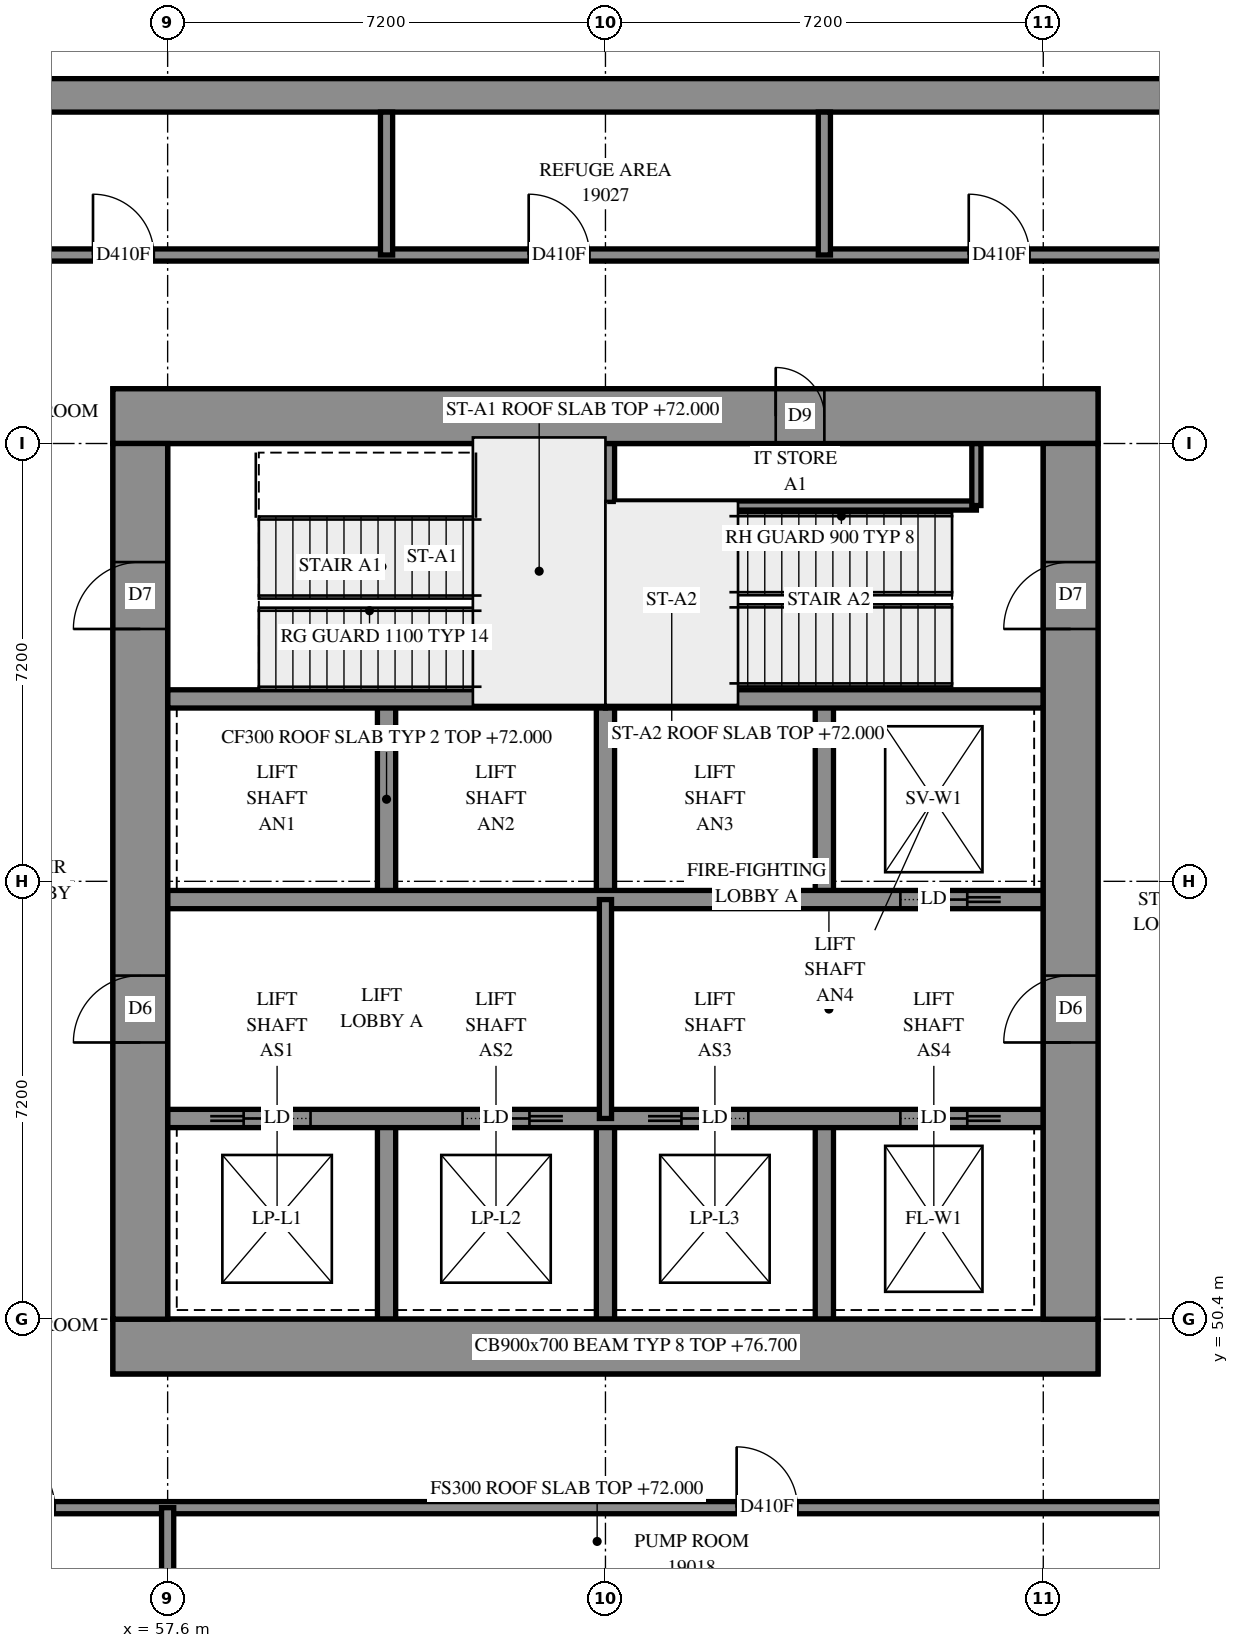
"""IFC4 building model, lengths in metres.
Left out: names, types, materials, properties, quantities, classifications, styles, units other than length and angle.
Written with IfcOpenShell. Run it as: python <this file> out.ifc"""

import sys

from ifc_helpers import new_model, si_unit, direction, frame, frame_2d, origin, place, context, subcontext, project, spatial, polyline, rectangle, outline, extrude, element, fill, save


model = new_model("IFC4")
c1 = context("Model", 3, precision=1e-05, world=origin(), true_north=direction((0.0, 1.0)))
c2 = subcontext(c1, "Body", "Model", "MODEL_VIEW")
j1 = project(units=[si_unit("LENGTHUNIT", "METRE"), si_unit("PLANEANGLEUNIT", "RADIAN")], contexts=[c1])
p1 = place(None, origin())
s1 = spatial("IfcSite", under=j1, at=p1, CompositionType="ELEMENT")
p2 = place(p1, origin())
s2 = spatial("IfcBuilding", under=s1, at=p2, CompositionType="ELEMENT")
p3 = place(p2, frame((0.0, 0.0, 72.0)))
s3 = spatial("IfcBuildingStorey", under=s2, at=p3, CompositionType="ELEMENT", Elevation=72.0)
p4 = place(p3, frame((56.7, 49.95, -0.3), z_axis=(0.0, 0.0, 1.0), x_axis=(1.0, 0.0, 0.0)))
e1 = element("IfcWall", 1, at=p4, inside=s3, PredefinedType="SHEAR", context=c2, shape_type="SweptSolid", body=[
    extrude(rectangle(XDim=16.2, YDim=0.9, at=frame_2d((8.1, 0.0))), origin(), (0.0, 0.0, 1.0), 4.3),
])
p5 = place(p3, frame((56.7, 65.25, -0.3), z_axis=(0.0, 0.0, 1.0), x_axis=(1.0, 0.0, 0.0)))
e2 = element("IfcWall", 2, at=p5, inside=s3, PredefinedType="SHEAR", context=c2, shape_type="SweptSolid", body=[
    extrude(rectangle(XDim=16.2, YDim=0.9, at=frame_2d((8.1, 0.0))), origin(), (0.0, 0.0, 1.0), 4.3),
])
p6 = place(p5, frame((10.9, 0.0, 0.3)))
e3 = element("IfcOpeningElement", 3, at=p6, cuts=e2, PredefinedType="OPENING", context=c2, shape_type="SweptSolid", body=[
    extrude(rectangle(XDim=0.8, YDim=2.1, at=frame_2d((0.4, 1.05))), frame((0.0, 0.46, 0.0), z_axis=(0.0, -1.0, 0.0), x_axis=(1.0, 0.0, 0.0)), (0.0, 0.0, 1.0), 0.92),
])
p7 = place(p3, frame((57.15, 50.4, -0.3), z_axis=(0.0, 0.0, 1.0), x_axis=(0.0, 1.0, 0.0)))
e4 = element("IfcWall", 4, at=p7, inside=s3, PredefinedType="SHEAR", context=c2, shape_type="SweptSolid", body=[
    extrude(rectangle(XDim=14.4, YDim=0.9, at=frame_2d((7.2, 0.0))), origin(), (0.0, 0.0, 1.0), 4.3),
])
p8 = place(p7, frame((4.55, 0.0, 0.3)))
e5 = element("IfcOpeningElement", 5, at=p8, cuts=e4, PredefinedType="OPENING", context=c2, shape_type="SweptSolid", body=[
    extrude(rectangle(XDim=1.1, YDim=2.1, at=frame_2d((0.55, 1.05))), frame((0.0, 0.46, 0.0), z_axis=(0.0, -1.0, 0.0), x_axis=(1.0, 0.0, 0.0)), (0.0, 0.0, 1.0), 0.92),
])
p9 = place(p7, frame((11.35, 0.0, 0.3)))
e6 = element("IfcOpeningElement", 6, at=p9, cuts=e4, PredefinedType="OPENING", context=c2, shape_type="SweptSolid", body=[
    extrude(rectangle(XDim=1.1, YDim=2.1, at=frame_2d((0.55, 1.05))), frame((0.0, 0.46, 0.0), z_axis=(0.0, -1.0, 0.0), x_axis=(1.0, 0.0, 0.0)), (0.0, 0.0, 1.0), 0.92),
])
p10 = place(p3, frame((72.45, 50.4, -0.3), z_axis=(0.0, 0.0, 1.0), x_axis=(0.0, 1.0, 0.0)))
e7 = element("IfcWall", 7, at=p10, inside=s3, PredefinedType="SHEAR", context=c2, shape_type="SweptSolid", body=[
    extrude(rectangle(XDim=14.4, YDim=0.9, at=frame_2d((7.2, 0.0))), origin(), (0.0, 0.0, 1.0), 4.3),
])
p11 = place(p10, frame((4.55, 0.0, 0.3)))
e8 = element("IfcOpeningElement", 8, at=p11, cuts=e7, PredefinedType="OPENING", context=c2, shape_type="SweptSolid", body=[
    extrude(rectangle(XDim=1.1, YDim=2.1, at=frame_2d((0.55, 1.05))), frame((0.0, 0.46, 0.0), z_axis=(0.0, -1.0, 0.0), x_axis=(1.0, 0.0, 0.0)), (0.0, 0.0, 1.0), 0.92),
])
p12 = place(p10, frame((11.35, 0.0, 0.3)))
e9 = element("IfcOpeningElement", 9, at=p12, cuts=e7, PredefinedType="OPENING", context=c2, shape_type="SweptSolid", body=[
    extrude(rectangle(XDim=1.1, YDim=2.1, at=frame_2d((0.55, 1.05))), frame((0.0, 0.46, 0.0), z_axis=(0.0, -1.0, 0.0), x_axis=(1.0, 0.0, 0.0)), (0.0, 0.0, 1.0), 0.92),
])
for number, where, z_axis, x_axis in (
    (10, (61.2, 50.4, 0.0), (0.0, 0.0, 1.0), (0.0, 1.0, 0.0)),
    (11, (61.2, 57.3, 0.0), (0.0, 0.0, 1.0), (0.0, 1.0, 0.0)),
    (12, (64.8, 50.4, 0.0), (0.0, 0.0, 1.0), (0.0, 1.0, 0.0)),
    (13, (64.8, 57.3, 0.0), (0.0, 0.0, 1.0), (0.0, 1.0, 0.0)),
    (14, (68.4, 50.4, 0.0), (0.0, 0.0, 1.0), (0.0, 1.0, 0.0)),
    (15, (68.4, 57.3, 0.0), (0.0, 0.0, 1.0), (0.0, 1.0, 0.0)),
):
    element("IfcWall", number, at=place(p3, frame(where, z_axis=z_axis, x_axis=x_axis)), inside=s3, PredefinedType="SOLIDWALL", context=c2, shape_type="SweptSolid", body=[
        extrude(rectangle(XDim=3.3, YDim=0.3, at=frame_2d((1.65, 0.0))), origin(), (0.0, 0.0, 1.0), 4.7),
    ])
p13 = place(p3, frame((57.6, 53.7, 0.0), z_axis=(0.0, 0.0, 1.0), x_axis=(1.0, 0.0, 0.0)))
e16 = element("IfcWall", 16, at=p13, inside=s3, PredefinedType="SOLIDWALL", context=c2, shape_type="SweptSolid", body=[
    extrude(rectangle(XDim=14.4, YDim=0.3, at=frame_2d((7.2, 0.0))), origin(), (0.0, 0.0, 1.0), 4.7),
])
p14 = place(p13, frame((1.25, 0.0, 0.0)))
e17 = element("IfcOpeningElement", 17, at=p14, cuts=e16, PredefinedType="OPENING", context=c2, shape_type="SweptSolid", body=[
    extrude(rectangle(XDim=1.1, YDim=2.1, at=frame_2d((0.55, 1.05))), frame((0.0, 0.16, 0.0), z_axis=(0.0, -1.0, 0.0), x_axis=(1.0, 0.0, 0.0)), (0.0, 0.0, 1.0), 0.32),
])
p15 = place(p13, frame((4.85, 0.0, 0.0)))
e18 = element("IfcOpeningElement", 18, at=p15, cuts=e16, PredefinedType="OPENING", context=c2, shape_type="SweptSolid", body=[
    extrude(rectangle(XDim=1.1, YDim=2.1, at=frame_2d((0.55, 1.05))), frame((0.0, 0.16, 0.0), z_axis=(0.0, -1.0, 0.0), x_axis=(1.0, 0.0, 0.0)), (0.0, 0.0, 1.0), 0.32),
])
p16 = place(p13, frame((8.45, 0.0, 0.0)))
e19 = element("IfcOpeningElement", 19, at=p16, cuts=e16, PredefinedType="OPENING", context=c2, shape_type="SweptSolid", body=[
    extrude(rectangle(XDim=1.1, YDim=2.1, at=frame_2d((0.55, 1.05))), frame((0.0, 0.16, 0.0), z_axis=(0.0, -1.0, 0.0), x_axis=(1.0, 0.0, 0.0)), (0.0, 0.0, 1.0), 0.32),
])
p17 = place(p13, frame((12.05, 0.0, 0.0)))
e20 = element("IfcOpeningElement", 20, at=p17, cuts=e16, PredefinedType="OPENING", context=c2, shape_type="SweptSolid", body=[
    extrude(rectangle(XDim=1.1, YDim=2.1, at=frame_2d((0.55, 1.05))), frame((0.0, 0.16, 0.0), z_axis=(0.0, -1.0, 0.0), x_axis=(1.0, 0.0, 0.0)), (0.0, 0.0, 1.0), 0.32),
])
p18 = place(p3, frame((57.6, 57.3, 0.0), z_axis=(0.0, 0.0, 1.0), x_axis=(1.0, 0.0, 0.0)))
e21 = element("IfcWall", 21, at=p18, inside=s3, PredefinedType="SOLIDWALL", context=c2, shape_type="SweptSolid", body=[
    extrude(rectangle(XDim=14.4, YDim=0.3, at=frame_2d((7.2, 0.0))), origin(), (0.0, 0.0, 1.0), 4.7),
])
p19 = place(p18, frame((12.05, 0.0, 0.0)))
e22 = element("IfcOpeningElement", 22, at=p19, cuts=e21, PredefinedType="OPENING", context=c2, shape_type="SweptSolid", body=[
    extrude(rectangle(XDim=1.1, YDim=2.1, at=frame_2d((0.55, 1.05))), frame((0.0, 0.16, 0.0), z_axis=(0.0, -1.0, 0.0), x_axis=(1.0, 0.0, 0.0)), (0.0, 0.0, 1.0), 0.32),
])
for number, where, z_axis, x_axis in (
    (23, (57.6, 60.6, 0.0), (0.0, 0.0, 1.0), (1.0, 0.0, 0.0)),
    (24, (64.8, 60.6, 0.0), (0.0, 0.0, 1.0), (1.0, 0.0, 0.0)),
):
    element("IfcWall", number, at=place(p3, frame(where, z_axis=z_axis, x_axis=x_axis)), inside=s3, PredefinedType="SOLIDWALL", context=c2, shape_type="SweptSolid", body=[
        extrude(rectangle(XDim=7.2, YDim=0.3, at=frame_2d((3.6, 0.0))), origin(), (0.0, 0.0, 1.0), 4.7),
    ])
p20 = place(p3, frame((64.8, 60.6, 0.0), z_axis=(0.0, 0.0, 1.0), x_axis=(0.0, 1.0, 0.0)))
e25 = element("IfcWall", 25, at=p20, inside=s3, PredefinedType="SOLIDWALL", context=c2, shape_type="SweptSolid", body=[
    extrude(rectangle(XDim=4.2, YDim=0.3, at=frame_2d((2.1, 0.0))), origin(), (0.0, 0.0, 1.0), 4.7),
])
p21 = place(p3, frame((78.589, 70.525, 0.0), z_axis=(0.0, 0.0, 1.0), x_axis=(-1.0, 0.0, 0.0)))
e26 = element("IfcWall", 26, at=p21, inside=s3, PredefinedType="SOLIDWALL", context=c2, shape_type="SweptSolid", body=[
    extrude(outline(polyline([(-0.114, -0.275), (55.789, -0.275), (55.239, 0.275), (0.114, 0.275), (-0.114, -0.275)])), origin(), (0.0, 0.0, 1.0), 4.7),
])
p22 = place(p3, frame((64.95, 63.78, 0.0), z_axis=(0.0, 0.0, 1.0), x_axis=(1.0, 0.0, 0.0)))
e27 = element("IfcWall", 27, at=p22, inside=s3, PredefinedType="PARTITIONING", context=c2, shape_type="SweptSolid", body=[
    extrude(rectangle(XDim=5.95, YDim=0.15, at=frame_2d((2.975, 0.0))), origin(), (0.0, 0.0, 1.0), 4.7),
])
p23 = place(p3, frame((70.9, 63.78, 0.0), z_axis=(0.0, 0.0, 1.0), x_axis=(0.0, 1.0, 0.0)))
e28 = element("IfcWall", 28, at=p23, inside=s3, PredefinedType="PARTITIONING", context=c2, shape_type="SweptSolid", body=[
    extrude(rectangle(XDim=1.02, YDim=0.15, at=frame_2d((0.51, 0.0))), origin(), (0.0, 0.0, 1.0), 4.7),
])
p24 = place(p3, frame((64.8, 53.7, 0.0), z_axis=(0.0, 0.0, 1.0), x_axis=(0.0, 1.0, 0.0)))
e29 = element("IfcWall", 29, at=p24, inside=s3, PredefinedType="PARTITIONING", context=c2, shape_type="SweptSolid", body=[
    extrude(rectangle(XDim=3.6, YDim=0.2, at=frame_2d((1.8, 0.0))), origin(), (0.0, 0.0, 1.0), 4.7),
])
p25 = place(p3, frame((54.502, 67.9, 0.0), z_axis=(0.0, 0.0, 1.0), x_axis=(1.0, 0.0, 0.0)))
e30 = element("IfcWall", 30, at=p25, inside=s3, PredefinedType="PARTITIONING", context=c2, shape_type="SweptSolid", body=[
    extrude(rectangle(XDim=20.598, YDim=0.2, at=frame_2d((10.299, 0.0))), origin(), (0.0, 0.0, 1.0), 4.7),
])
p26 = place(p25, frame((1.871, 0.0, 0.0)))
e31 = element("IfcOpeningElement", 31, at=p26, cuts=e30, PredefinedType="OPENING", context=c2, shape_type="SweptSolid", body=[
    extrude(rectangle(XDim=1.0, YDim=2.1, at=frame_2d((0.5, 1.05))), frame((0.0, 0.11, 0.0), z_axis=(0.0, -1.0, 0.0), x_axis=(1.0, 0.0, 0.0)), (0.0, 0.0, 1.0), 0.22),
])
p27 = place(p25, frame((16.273, 0.0, 0.0)))
e32 = element("IfcOpeningElement", 32, at=p27, cuts=e30, PredefinedType="OPENING", context=c2, shape_type="SweptSolid", body=[
    extrude(rectangle(XDim=1.0, YDim=2.1, at=frame_2d((0.5, 1.05))), frame((0.0, 0.11, 0.0), z_axis=(0.0, -1.0, 0.0), x_axis=(1.0, 0.0, 0.0)), (0.0, 0.0, 1.0), 0.22),
])
p28 = place(p25, frame((9.036, 0.0, 0.0)))
e33 = element("IfcOpeningElement", 33, at=p28, cuts=e30, PredefinedType="OPENING", context=c2, shape_type="SweptSolid", body=[
    extrude(rectangle(XDim=1.0, YDim=2.1, at=frame_2d((0.5, 1.05))), frame((0.0, 0.11, 0.0), z_axis=(0.0, -1.0, 0.0), x_axis=(1.0, 0.0, 0.0)), (0.0, 0.0, 1.0), 0.22),
])
p29 = place(p3, frame((54.5, 47.3, 0.0), z_axis=(0.0, 0.0, 1.0), x_axis=(1.0, 0.0, 0.0)))
e34 = element("IfcWall", 34, at=p29, inside=s3, PredefinedType="PARTITIONING", context=c2, shape_type="SweptSolid", body=[
    extrude(rectangle(XDim=19.56, YDim=0.2, at=frame_2d((9.78, 0.0))), origin(), (0.0, 0.0, 1.0), 4.7),
])
p30 = place(p29, frame((0.243, 0.0, 0.0)))
e35 = element("IfcOpeningElement", 35, at=p30, cuts=e34, PredefinedType="OPENING", context=c2, shape_type="SweptSolid", body=[
    extrude(rectangle(XDim=1.0, YDim=2.1, at=frame_2d((0.5, 1.05))), frame((0.0, 0.11, 0.0), z_axis=(0.0, -1.0, 0.0), x_axis=(1.0, 0.0, 0.0)), (0.0, 0.0, 1.0), 0.22),
])
p31 = place(p29, frame((12.457, 0.0, 0.0)))
e36 = element("IfcOpeningElement", 36, at=p31, cuts=e34, PredefinedType="OPENING", context=c2, shape_type="SweptSolid", body=[
    extrude(rectangle(XDim=1.0, YDim=2.1, at=frame_2d((0.5, 1.05))), frame((0.0, 0.11, 0.0), z_axis=(0.0, -1.0, 0.0), x_axis=(1.0, 0.0, 0.0)), (0.0, 0.0, 1.0), 0.22),
])
for number, where, z_axis, x_axis in (
    (37, (57.6, 44.95, 0.0), (0.0, 0.0, 1.0), (0.0, 1.0, 0.0)),
    (38, (61.2, 67.9, 0.0), (0.0, 0.0, 1.0), (0.0, 1.0, 0.0)),
    (39, (68.4, 67.9, 0.0), (0.0, 0.0, 1.0), (0.0, 1.0, 0.0)),
):
    element("IfcWall", number, at=place(p3, frame(where, z_axis=z_axis, x_axis=x_axis)), inside=s3, PredefinedType="PARTITIONING", context=c2, shape_type="SweptSolid", body=[
        extrude(rectangle(XDim=2.35, YDim=0.2, at=frame_2d((1.175, 0.0))), origin(), (0.0, 0.0, 1.0), 4.7),
    ])
p32 = place(p6, origin())
e40 = element("IfcDoor", 40, at=p32, inside=s3, OperationType="SINGLE_SWING_RIGHT", PredefinedType="DOOR", context=c2, shape_type="SweptSolid", body=[
    extrude(rectangle(XDim=0.8, YDim=2.1, at=frame_2d((0.4, 1.05))), frame((0.0, -0.39, 0.0), z_axis=(0.0, -1.0, 0.0), x_axis=(1.0, 0.0, 0.0)), (0.0, 0.0, 1.0), 0.05),
])
fill(e3, e40)
p33 = place(p8, origin())
e41 = element("IfcDoor", 41, at=p33, inside=s3, OperationType="DOUBLE_DOOR_SINGLE_SWING", PredefinedType="DOOR", context=c2, shape_type="SweptSolid", body=[
    extrude(rectangle(XDim=1.1, YDim=2.1, at=frame_2d((0.55, 1.05))), frame((0.0, 0.025, 0.0), z_axis=(0.0, -1.0, 0.0), x_axis=(1.0, 0.0, 0.0)), (0.0, 0.0, 1.0), 0.05),
])
fill(e5, e41)
p34 = place(p11, origin())
e42 = element("IfcDoor", 42, at=p34, inside=s3, OperationType="DOUBLE_DOOR_SINGLE_SWING", PredefinedType="DOOR", context=c2, shape_type="SweptSolid", body=[
    extrude(rectangle(XDim=1.1, YDim=2.1, at=frame_2d((0.55, 1.05))), frame((0.0, 0.025, 0.0), z_axis=(0.0, -1.0, 0.0), x_axis=(1.0, 0.0, 0.0)), (0.0, 0.0, 1.0), 0.05),
])
fill(e8, e42)
p35 = place(p9, origin())
e43 = element("IfcDoor", 43, at=p35, inside=s3, OperationType="SINGLE_SWING_LEFT", PredefinedType="DOOR", context=c2, shape_type="SweptSolid", body=[
    extrude(rectangle(XDim=1.1, YDim=2.1, at=frame_2d((0.55, 1.05))), frame((0.0, 0.025, 0.0), z_axis=(0.0, -1.0, 0.0), x_axis=(1.0, 0.0, 0.0)), (0.0, 0.0, 1.0), 0.05),
])
fill(e6, e43)
p36 = place(p12, origin())
e44 = element("IfcDoor", 44, at=p36, inside=s3, OperationType="SINGLE_SWING_RIGHT", PredefinedType="DOOR", context=c2, shape_type="SweptSolid", body=[
    extrude(rectangle(XDim=1.1, YDim=2.1, at=frame_2d((0.55, 1.05))), frame((0.0, 0.025, 0.0), z_axis=(0.0, -1.0, 0.0), x_axis=(1.0, 0.0, 0.0)), (0.0, 0.0, 1.0), 0.05),
])
fill(e9, e44)
p37 = place(p14, origin())
e45 = element("IfcDoor", 45, at=p37, inside=s3, OperationType="SLIDING_TO_LEFT", PredefinedType="DOOR", context=c2, shape_type="SweptSolid", body=[
    extrude(rectangle(XDim=1.1, YDim=2.1, at=frame_2d((0.55, 1.05))), frame((0.0, 0.025, 0.0), z_axis=(0.0, -1.0, 0.0), x_axis=(1.0, 0.0, 0.0)), (0.0, 0.0, 1.0), 0.05),
])
fill(e17, e45)
p38 = place(p15, origin())
e46 = element("IfcDoor", 46, at=p38, inside=s3, OperationType="SLIDING_TO_RIGHT", PredefinedType="DOOR", context=c2, shape_type="SweptSolid", body=[
    extrude(rectangle(XDim=1.1, YDim=2.1, at=frame_2d((0.55, 1.05))), frame((0.0, 0.025, 0.0), z_axis=(0.0, -1.0, 0.0), x_axis=(1.0, 0.0, 0.0)), (0.0, 0.0, 1.0), 0.05),
])
fill(e18, e46)
p39 = place(p16, origin())
e47 = element("IfcDoor", 47, at=p39, inside=s3, OperationType="SLIDING_TO_LEFT", PredefinedType="DOOR", context=c2, shape_type="SweptSolid", body=[
    extrude(rectangle(XDim=1.1, YDim=2.1, at=frame_2d((0.55, 1.05))), frame((0.0, 0.025, 0.0), z_axis=(0.0, -1.0, 0.0), x_axis=(1.0, 0.0, 0.0)), (0.0, 0.0, 1.0), 0.05),
])
fill(e19, e47)
p40 = place(p17, origin())
e48 = element("IfcDoor", 48, at=p40, inside=s3, OperationType="SLIDING_TO_RIGHT", PredefinedType="DOOR", context=c2, shape_type="SweptSolid", body=[
    extrude(rectangle(XDim=1.1, YDim=2.1, at=frame_2d((0.55, 1.05))), frame((0.0, 0.025, 0.0), z_axis=(0.0, -1.0, 0.0), x_axis=(1.0, 0.0, 0.0)), (0.0, 0.0, 1.0), 0.05),
])
fill(e20, e48)
p41 = place(p19, origin())
e49 = element("IfcDoor", 49, at=p41, inside=s3, OperationType="SLIDING_TO_RIGHT", PredefinedType="DOOR", context=c2, shape_type="SweptSolid", body=[
    extrude(rectangle(XDim=1.1, YDim=2.1, at=frame_2d((0.55, 1.05))), frame((0.0, 0.025, 0.0), z_axis=(0.0, -1.0, 0.0), x_axis=(1.0, 0.0, 0.0)), (0.0, 0.0, 1.0), 0.05),
])
fill(e22, e49)
p42 = place(p30, origin())
e50 = element("IfcDoor", 50, at=p42, inside=s3, OperationType="SINGLE_SWING_RIGHT", PredefinedType="DOOR", context=c2, shape_type="SweptSolid", body=[
    extrude(rectangle(XDim=1.0, YDim=2.1, at=frame_2d((0.5, 1.05))), frame((0.0, 0.025, 0.0), z_axis=(0.0, -1.0, 0.0), x_axis=(1.0, 0.0, 0.0)), (0.0, 0.0, 1.0), 0.05),
])
fill(e35, e50)
p43 = place(p31, origin())
e51 = element("IfcDoor", 51, at=p43, inside=s3, OperationType="SINGLE_SWING_LEFT", PredefinedType="DOOR", context=c2, shape_type="SweptSolid", body=[
    extrude(rectangle(XDim=1.0, YDim=2.1, at=frame_2d((0.5, 1.05))), frame((0.0, 0.025, 0.0), z_axis=(0.0, -1.0, 0.0), x_axis=(1.0, 0.0, 0.0)), (0.0, 0.0, 1.0), 0.05),
])
fill(e36, e51)
p44 = place(p26, origin())
e52 = element("IfcDoor", 52, at=p44, inside=s3, OperationType="SINGLE_SWING_LEFT", PredefinedType="DOOR", context=c2, shape_type="SweptSolid", body=[
    extrude(rectangle(XDim=1.0, YDim=2.1, at=frame_2d((0.5, 1.05))), frame((0.0, 0.025, 0.0), z_axis=(0.0, -1.0, 0.0), x_axis=(1.0, 0.0, 0.0)), (0.0, 0.0, 1.0), 0.05),
])
fill(e31, e52)
p45 = place(p27, origin())
e53 = element("IfcDoor", 53, at=p45, inside=s3, OperationType="SINGLE_SWING_LEFT", PredefinedType="DOOR", context=c2, shape_type="SweptSolid", body=[
    extrude(rectangle(XDim=1.0, YDim=2.1, at=frame_2d((0.5, 1.05))), frame((0.0, 0.025, 0.0), z_axis=(0.0, -1.0, 0.0), x_axis=(1.0, 0.0, 0.0)), (0.0, 0.0, 1.0), 0.05),
])
fill(e32, e53)
p46 = place(p28, origin())
e54 = element("IfcDoor", 54, at=p46, inside=s3, OperationType="SINGLE_SWING_LEFT", PredefinedType="DOOR", context=c2, shape_type="SweptSolid", body=[
    extrude(rectangle(XDim=1.0, YDim=2.1, at=frame_2d((0.5, 1.05))), frame((0.0, 0.025, 0.0), z_axis=(0.0, -1.0, 0.0), x_axis=(1.0, 0.0, 0.0)), (0.0, 0.0, 1.0), 0.05),
])
fill(e33, e54)
save(model, sys.argv[1])
